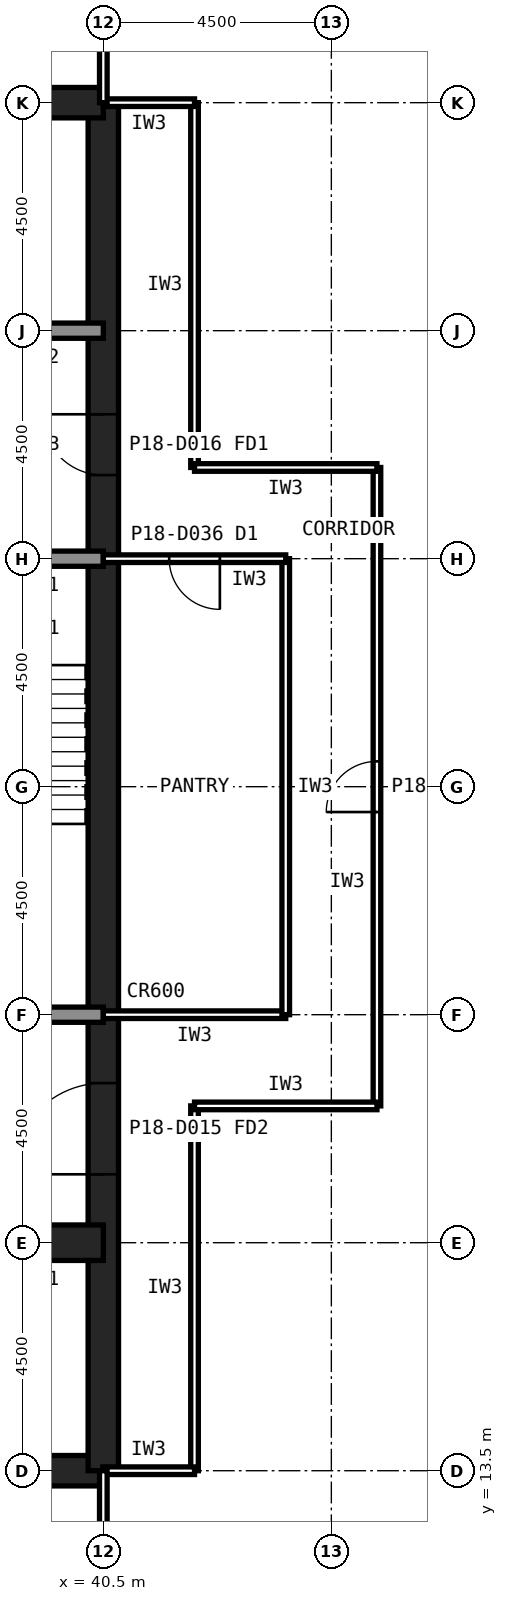
"""IFC4 building model, lengths in metres.
Left out: names, types, materials, properties, quantities, classifications, styles, units other than length and angle.
Written with IfcOpenShell. Run it as: python <this file> out.ifc"""

import sys

from ifc_helpers import new_model, si_unit, direction, frame, frame_2d, origin, place, context, subcontext, project, spatial, rectangle, extrude, element, fill, save


model = new_model("IFC4")
c1 = context("Model", 3, precision=1e-05, world=origin(), true_north=direction((0.0, 1.0)))
c2 = subcontext(c1, "Body", "Model", "MODEL_VIEW")
j1 = project(units=[si_unit("LENGTHUNIT", "METRE"), si_unit("PLANEANGLEUNIT", "RADIAN")], contexts=[c1])
p1 = place(None, origin())
s1 = spatial("IfcSite", under=j1, at=p1, CompositionType="ELEMENT")
p2 = place(p1, origin())
s2 = spatial("IfcBuilding", under=s1, at=p2, CompositionType="ELEMENT")
p3 = place(p2, frame((0.0, 0.0, 79.4)))
s3 = spatial("IfcBuildingStorey", under=s2, at=p3, CompositionType="ELEMENT", Elevation=79.4)
p4 = place(p3, frame((13.5, 13.5, 0.0), z_axis=(0.0, 0.0, 1.0), x_axis=(1.0, 0.0, 0.0)))
e1 = element("IfcWall", 1, at=p4, inside=s3, PredefinedType="SHEAR", context=c2, shape_type="SweptSolid", body=[
    extrude(rectangle(XDim=27.0, YDim=0.6, at=frame_2d((13.5, 0.0))), origin(), (0.0, 0.0, 1.0), 4.2),
])
p5 = place(p3, frame((40.5, 13.5, 0.0), z_axis=(0.0, 0.0, 1.0), x_axis=(0.0, 1.0, 0.0)))
e2 = element("IfcWall", 2, at=p5, inside=s3, PredefinedType="SHEAR", context=c2, shape_type="SweptSolid", body=[
    extrude(rectangle(XDim=27.0, YDim=0.6, at=frame_2d((13.5, 0.0))), origin(), (0.0, 0.0, 1.0), 4.2),
])
p6 = place(p5, frame((5.85, 0.0, 0.0)))
e3 = element("IfcOpeningElement", 3, at=p6, cuts=e2, PredefinedType="OPENING", context=c2, shape_type="SweptSolid", body=[
    extrude(rectangle(XDim=1.8, YDim=2.1, at=frame_2d((0.9, 1.05))), frame((0.0, 0.31, 0.0), z_axis=(0.0, -1.0, 0.0), x_axis=(1.0, 0.0, 0.0)), (0.0, 0.0, 1.0), 0.62),
])
p7 = place(p5, frame((19.65, 0.0, 0.0)))
e4 = element("IfcOpeningElement", 4, at=p7, cuts=e2, PredefinedType="OPENING", context=c2, shape_type="SweptSolid", body=[
    extrude(rectangle(XDim=1.2, YDim=2.1, at=frame_2d((0.6, 1.05))), frame((0.0, 0.31, 0.0), z_axis=(0.0, -1.0, 0.0), x_axis=(1.0, 0.0, 0.0)), (0.0, 0.0, 1.0), 0.62),
])
p8 = place(p3, frame((40.5, 40.5, 0.0), z_axis=(0.0, 0.0, 1.0), x_axis=(-1.0, 0.0, 0.0)))
e5 = element("IfcWall", 5, at=p8, inside=s3, PredefinedType="SHEAR", context=c2, shape_type="SweptSolid", body=[
    extrude(rectangle(XDim=27.0, YDim=0.6, at=frame_2d((13.5, 0.0))), origin(), (0.0, 0.0, 1.0), 4.2),
])
p9 = place(p3, frame((13.5, 18.0, 0.0), z_axis=(0.0, 0.0, 1.0), x_axis=(1.0, 0.0, 0.0)))
e6 = element("IfcWall", 6, at=p9, inside=s3, PredefinedType="SHEAR", context=c2, shape_type="SweptSolid", body=[
    extrude(rectangle(XDim=27.0, YDim=0.7, at=frame_2d((13.5, 0.0))), origin(), (0.0, 0.0, 1.0), 4.2),
])
p10 = place(p9, frame((24.3, 0.0, 0.0)))
e7 = element("IfcOpeningElement", 7, at=p10, cuts=e6, PredefinedType="OPENING", context=c2, shape_type="SweptSolid", body=[
    extrude(rectangle(XDim=0.9, YDim=2.1, at=frame_2d((0.45, 1.05))), frame((0.0, 0.36, 0.0), z_axis=(0.0, -1.0, 0.0), x_axis=(1.0, 0.0, 0.0)), (0.0, 0.0, 1.0), 0.72),
])
p11 = place(p9, frame((5.45, 0.0, 0.0)))
e8 = element("IfcOpeningElement", 8, at=p11, cuts=e6, PredefinedType="OPENING", context=c2, shape_type="SweptSolid", body=[
    extrude(rectangle(XDim=1.1, YDim=2.1, at=frame_2d((0.55, 1.05))), frame((0.0, 0.36, 0.0), z_axis=(0.0, -1.0, 0.0), x_axis=(1.0, 0.0, 0.0)), (0.0, 0.0, 1.0), 0.72),
])
p12 = place(p9, frame((8.45, 0.0, 0.0)))
e9 = element("IfcOpeningElement", 9, at=p12, cuts=e6, PredefinedType="OPENING", context=c2, shape_type="SweptSolid", body=[
    extrude(rectangle(XDim=1.1, YDim=2.1, at=frame_2d((0.55, 1.05))), frame((0.0, 0.36, 0.0), z_axis=(0.0, -1.0, 0.0), x_axis=(1.0, 0.0, 0.0)), (0.0, 0.0, 1.0), 0.72),
])
p13 = place(p9, frame((11.45, 0.0, 0.0)))
e10 = element("IfcOpeningElement", 10, at=p13, cuts=e6, PredefinedType="OPENING", context=c2, shape_type="SweptSolid", body=[
    extrude(rectangle(XDim=1.1, YDim=2.1, at=frame_2d((0.55, 1.05))), frame((0.0, 0.36, 0.0), z_axis=(0.0, -1.0, 0.0), x_axis=(1.0, 0.0, 0.0)), (0.0, 0.0, 1.0), 0.72),
])
p14 = place(p9, frame((14.45, 0.0, 0.0)))
e11 = element("IfcOpeningElement", 11, at=p14, cuts=e6, PredefinedType="OPENING", context=c2, shape_type="SweptSolid", body=[
    extrude(rectangle(XDim=1.1, YDim=2.1, at=frame_2d((0.55, 1.05))), frame((0.0, 0.36, 0.0), z_axis=(0.0, -1.0, 0.0), x_axis=(1.0, 0.0, 0.0)), (0.0, 0.0, 1.0), 0.72),
])
p15 = place(p9, frame((17.45, 0.0, 0.0)))
e12 = element("IfcOpeningElement", 12, at=p15, cuts=e6, PredefinedType="OPENING", context=c2, shape_type="SweptSolid", body=[
    extrude(rectangle(XDim=1.1, YDim=2.1, at=frame_2d((0.55, 1.05))), frame((0.0, 0.36, 0.0), z_axis=(0.0, -1.0, 0.0), x_axis=(1.0, 0.0, 0.0)), (0.0, 0.0, 1.0), 0.72),
])
p16 = place(p9, frame((20.45, 0.0, 0.0)))
e13 = element("IfcOpeningElement", 13, at=p16, cuts=e6, PredefinedType="OPENING", context=c2, shape_type="SweptSolid", body=[
    extrude(rectangle(XDim=1.1, YDim=2.1, at=frame_2d((0.55, 1.05))), frame((0.0, 0.36, 0.0), z_axis=(0.0, -1.0, 0.0), x_axis=(1.0, 0.0, 0.0)), (0.0, 0.0, 1.0), 0.72),
])
p17 = place(p9, frame((1.6, 0.0, 0.0)))
e14 = element("IfcOpeningElement", 14, at=p17, cuts=e6, PredefinedType="OPENING", context=c2, shape_type="SweptSolid", body=[
    extrude(rectangle(XDim=1.3, YDim=2.2, at=frame_2d((0.65, 1.1))), frame((0.0, 0.36, 0.0), z_axis=(0.0, -1.0, 0.0), x_axis=(1.0, 0.0, 0.0)), (0.0, 0.0, 1.0), 0.72),
])
p18 = place(p3, frame((13.5, 36.0, 0.0), z_axis=(0.0, 0.0, 1.0), x_axis=(1.0, 0.0, 0.0)))
e15 = element("IfcWall", 15, at=p18, inside=s3, PredefinedType="SOLIDWALL", context=c2, shape_type="SweptSolid", body=[
    extrude(rectangle(XDim=27.0, YDim=0.3, at=frame_2d((13.5, 0.0))), origin(), (0.0, 0.0, 1.0), 4.04),
])
p19 = place(p18, frame((1.8, 0.0, 0.0)))
e16 = element("IfcOpeningElement", 16, at=p19, cuts=e15, PredefinedType="OPENING", context=c2, shape_type="SweptSolid", body=[
    extrude(rectangle(XDim=0.9, YDim=2.1, at=frame_2d((0.45, 1.05))), frame((0.0, 0.16, 0.0), z_axis=(0.0, -1.0, 0.0), x_axis=(1.0, 0.0, 0.0)), (0.0, 0.0, 1.0), 0.32),
])
p20 = place(p18, frame((24.1, 0.0, 0.0)))
e17 = element("IfcOpeningElement", 17, at=p20, cuts=e15, PredefinedType="OPENING", context=c2, shape_type="SweptSolid", body=[
    extrude(rectangle(XDim=1.3, YDim=2.2, at=frame_2d((0.65, 1.1))), frame((0.0, 0.16, 0.0), z_axis=(0.0, -1.0, 0.0), x_axis=(1.0, 0.0, 0.0)), (0.0, 0.0, 1.0), 0.32),
])
p21 = place(p3, frame((13.5, 22.5, 0.0), z_axis=(0.0, 0.0, 1.0), x_axis=(1.0, 0.0, 0.0)))
e18 = element("IfcWall", 18, at=p21, inside=s3, PredefinedType="SOLIDWALL", context=c2, shape_type="SweptSolid", body=[
    extrude(rectangle(XDim=27.0, YDim=0.3, at=frame_2d((13.5, 0.0))), origin(), (0.0, 0.0, 1.0), 4.04),
])
p22 = place(p21, frame((1.65, 0.0, 0.0)))
e19 = element("IfcOpeningElement", 19, at=p22, cuts=e18, PredefinedType="OPENING", context=c2, shape_type="SweptSolid", body=[
    extrude(rectangle(XDim=1.2, YDim=2.1, at=frame_2d((0.6, 1.05))), frame((0.0, 0.16, 0.0), z_axis=(0.0, -1.0, 0.0), x_axis=(1.0, 0.0, 0.0)), (0.0, 0.0, 1.0), 0.32),
])
p23 = place(p21, frame((6.025, 0.0, 0.0)))
e20 = element("IfcOpeningElement", 20, at=p23, cuts=e18, PredefinedType="OPENING", context=c2, shape_type="SweptSolid", body=[
    extrude(rectangle(XDim=1.0, YDim=2.1, at=frame_2d((0.5, 1.05))), frame((0.0, 0.16, 0.0), z_axis=(0.0, -1.0, 0.0), x_axis=(1.0, 0.0, 0.0)), (0.0, 0.0, 1.0), 0.32),
])
p24 = place(p21, frame((10.525, 0.0, 0.0)))
e21 = element("IfcOpeningElement", 21, at=p24, cuts=e18, PredefinedType="OPENING", context=c2, shape_type="SweptSolid", body=[
    extrude(rectangle(XDim=1.0, YDim=2.1, at=frame_2d((0.5, 1.05))), frame((0.0, 0.16, 0.0), z_axis=(0.0, -1.0, 0.0), x_axis=(1.0, 0.0, 0.0)), (0.0, 0.0, 1.0), 0.32),
])
p25 = place(p21, frame((19.75, 0.0, 0.0)))
e22 = element("IfcOpeningElement", 22, at=p25, cuts=e18, PredefinedType="OPENING", context=c2, shape_type="SweptSolid", body=[
    extrude(rectangle(XDim=1.0, YDim=2.1, at=frame_2d((0.5, 1.05))), frame((0.0, 0.16, 0.0), z_axis=(0.0, -1.0, 0.0), x_axis=(1.0, 0.0, 0.0)), (0.0, 0.0, 1.0), 0.32),
])
p26 = place(p21, frame((15.05, 0.0, 0.0)))
e23 = element("IfcOpeningElement", 23, at=p26, cuts=e18, PredefinedType="OPENING", context=c2, shape_type="SweptSolid", body=[
    extrude(rectangle(XDim=1.4, YDim=2.4, at=frame_2d((0.7, 1.2))), frame((0.0, 0.16, 0.0), z_axis=(0.0, -1.0, 0.0), x_axis=(1.0, 0.0, 0.0)), (0.0, 0.0, 1.0), 0.32),
])
p27 = place(p3, frame((13.5, 31.5, 0.0), z_axis=(0.0, 0.0, 1.0), x_axis=(1.0, 0.0, 0.0)))
e24 = element("IfcWall", 24, at=p27, inside=s3, PredefinedType="SOLIDWALL", context=c2, shape_type="SweptSolid", body=[
    extrude(rectangle(XDim=27.0, YDim=0.3, at=frame_2d((13.5, 0.0))), origin(), (0.0, 0.0, 1.0), 4.04),
])
p28 = place(p27, frame((24.15, 0.0, 0.0)))
e25 = element("IfcOpeningElement", 25, at=p28, cuts=e24, PredefinedType="OPENING", context=c2, shape_type="SweptSolid", body=[
    extrude(rectangle(XDim=1.2, YDim=2.1, at=frame_2d((0.6, 1.05))), frame((0.0, 0.16, 0.0), z_axis=(0.0, -1.0, 0.0), x_axis=(1.0, 0.0, 0.0)), (0.0, 0.0, 1.0), 0.32),
])
p29 = place(p27, frame((15.3, 0.0, 0.0)))
e26 = element("IfcOpeningElement", 26, at=p29, cuts=e24, PredefinedType="OPENING", context=c2, shape_type="SweptSolid", body=[
    extrude(rectangle(XDim=0.9, YDim=2.1, at=frame_2d((0.45, 1.05))), frame((0.0, 0.16, 0.0), z_axis=(0.0, -1.0, 0.0), x_axis=(1.0, 0.0, 0.0)), (0.0, 0.0, 1.0), 0.32),
])
p30 = place(p27, frame((19.8, 0.0, 0.0)))
e27 = element("IfcOpeningElement", 27, at=p30, cuts=e24, PredefinedType="OPENING", context=c2, shape_type="SweptSolid", body=[
    extrude(rectangle(XDim=0.9, YDim=2.1, at=frame_2d((0.45, 1.05))), frame((0.0, 0.16, 0.0), z_axis=(0.0, -1.0, 0.0), x_axis=(1.0, 0.0, 0.0)), (0.0, 0.0, 1.0), 0.32),
])
p31 = place(p3, frame((45.9, 20.7, 0.0), z_axis=(0.0, 0.0, 1.0), x_axis=(0.0, 1.0, 0.0)))
e28 = element("IfcWall", 28, at=p31, inside=s3, PredefinedType="PARTITIONING", context=c2, shape_type="SweptSolid", body=[
    extrude(rectangle(XDim=12.6, YDim=0.15, at=frame_2d((6.3, 0.0))), origin(), (0.0, 0.0, 1.0), 4.04),
])
p32 = place(p31, frame((5.8, 0.0, 0.0)))
e29 = element("IfcOpeningElement", 29, at=p32, cuts=e28, PredefinedType="OPENING", context=c2, shape_type="SweptSolid", body=[
    extrude(rectangle(XDim=1.0, YDim=2.1, at=frame_2d((0.5, 1.05))), frame((0.0, 0.085, 0.0), z_axis=(0.0, -1.0, 0.0), x_axis=(1.0, 0.0, 0.0)), (0.0, 0.0, 1.0), 0.17),
])
for number, where, z_axis, x_axis in (
    (30, (42.3, 13.5, 0.0), (0.0, 0.0, 1.0), (0.0, 1.0, 0.0)),
    (31, (42.3, 33.3, 0.0), (0.0, 0.0, 1.0), (0.0, 1.0, 0.0)),
):
    element("IfcWall", number, at=place(p3, frame(where, z_axis=z_axis, x_axis=x_axis)), inside=s3, PredefinedType="PARTITIONING", context=c2, shape_type="SweptSolid", body=[
        extrude(rectangle(XDim=7.2, YDim=0.15, at=frame_2d((3.6, 0.0))), origin(), (0.0, 0.0, 1.0), 4.04),
    ])
for number, where, z_axis, x_axis in (
    (32, (42.3, 20.7, 0.0), (0.0, 0.0, 1.0), (1.0, 0.0, 0.0)),
    (33, (45.9, 33.3, 0.0), (0.0, 0.0, 1.0), (-1.0, 0.0, 0.0)),
):
    element("IfcWall", number, at=place(p3, frame(where, z_axis=z_axis, x_axis=x_axis)), inside=s3, PredefinedType="PARTITIONING", context=c2, shape_type="SweptSolid", body=[
        extrude(rectangle(XDim=3.6, YDim=0.15, at=frame_2d((1.8, 0.0))), origin(), (0.0, 0.0, 1.0), 4.04),
    ])
p33 = place(p3, frame((40.49, 13.5, 0.0), z_axis=(0.0, 0.0, 1.0), x_axis=(1.0, 0.0, 0.0)))
e34 = element("IfcWall", 34, at=p33, inside=s3, PredefinedType="PARTITIONING", context=c2, shape_type="SweptSolid", body=[
    extrude(rectangle(XDim=1.81, YDim=0.15, at=frame_2d((0.905, 0.0))), origin(), (0.0, 0.0, 1.0), 3.189),
])
p34 = place(p3, frame((42.3, 40.5, 0.0), z_axis=(0.0, 0.0, 1.0), x_axis=(-1.0, 0.0, 0.0)))
e35 = element("IfcWall", 35, at=p34, inside=s3, PredefinedType="PARTITIONING", context=c2, shape_type="SweptSolid", body=[
    extrude(rectangle(XDim=1.8, YDim=0.15, at=frame_2d((0.9, 0.0))), origin(), (0.0, 0.0, 1.0), 3.189),
])
p35 = place(p3, frame((40.5, 22.5, 0.0), z_axis=(0.0, 0.0, 1.0), x_axis=(1.0, 0.0, 0.0)))
e36 = element("IfcWall", 36, at=p35, inside=s3, PredefinedType="PARTITIONING", context=c2, shape_type="SweptSolid", body=[
    extrude(rectangle(XDim=3.6, YDim=0.15, at=frame_2d((1.8, 0.0))), origin(), (0.0, 0.0, 1.0), 3.189),
])
p36 = place(p3, frame((44.1, 22.5, 0.0), z_axis=(0.0, 0.0, 1.0), x_axis=(0.0, 1.0, 0.0)))
e37 = element("IfcWall", 37, at=p36, inside=s3, PredefinedType="PARTITIONING", context=c2, shape_type="SweptSolid", body=[
    extrude(rectangle(XDim=9.0, YDim=0.15, at=frame_2d((4.5, 0.0))), origin(), (0.0, 0.0, 1.0), 4.04),
])
p37 = place(p3, frame((44.1, 31.5, 0.0), z_axis=(0.0, 0.0, 1.0), x_axis=(-1.0, 0.0, 0.0)))
e38 = element("IfcWall", 38, at=p37, inside=s3, PredefinedType="PARTITIONING", context=c2, shape_type="SweptSolid", body=[
    extrude(rectangle(XDim=3.6, YDim=0.15, at=frame_2d((1.8, 0.0))), origin(), (0.0, 0.0, 1.0), 3.189),
])
p38 = place(p37, frame((1.3, 0.0, 0.0)))
e39 = element("IfcOpeningElement", 39, at=p38, cuts=e38, PredefinedType="OPENING", context=c2, shape_type="SweptSolid", body=[
    extrude(rectangle(XDim=1.0, YDim=2.1, at=frame_2d((0.5, 1.05))), frame((0.0, 0.085, 0.0), z_axis=(0.0, -1.0, 0.0), x_axis=(1.0, 0.0, 0.0)), (0.0, 0.0, 1.0), 0.17),
])
p39 = place(p3, frame((40.5, 40.5, 0.0), z_axis=(0.0, 0.0, 1.0), x_axis=(0.0, 1.0, 0.0)))
e40 = element("IfcWall", 40, at=p39, inside=s3, PredefinedType="PARTITIONING", context=c2, shape_type="SweptSolid", body=[
    extrude(rectangle(XDim=3.0, YDim=0.15, at=frame_2d((1.5, 0.0))), origin(), (0.0, 0.0, 1.0), 3.189),
])
p40 = place(p3, frame((40.5, 5.4, 0.0), z_axis=(0.0, 0.0, 1.0), x_axis=(0.0, 1.0, 0.0)))
e41 = element("IfcWall", 41, at=p40, inside=s3, PredefinedType="PARTITIONING", context=c2, shape_type="SweptSolid", body=[
    extrude(rectangle(XDim=8.1, YDim=0.15, at=frame_2d((4.05, 0.0))), origin(), (0.0, 0.0, 1.0), 3.189),
])
p41 = place(p40, frame((3.55, 0.0, 0.0)))
e42 = element("IfcOpeningElement", 42, at=p41, cuts=e41, PredefinedType="OPENING", context=c2, shape_type="SweptSolid", body=[
    extrude(rectangle(XDim=1.0, YDim=2.1, at=frame_2d((0.5, 1.05))), frame((0.0, 0.085, 0.0), z_axis=(0.0, -1.0, 0.0), x_axis=(1.0, 0.0, 0.0)), (0.0, 0.0, 1.0), 0.17),
])
p42 = place(p6, origin())
e43 = element("IfcDoor", 43, at=p42, inside=s3, OperationType="SINGLE_SWING_LEFT", PredefinedType="DOOR", context=c2, shape_type="SweptSolid", body=[
    extrude(rectangle(XDim=1.8, YDim=2.1, at=frame_2d((0.9, 1.05))), frame((0.0, 0.025, 0.0), z_axis=(0.0, -1.0, 0.0), x_axis=(1.0, 0.0, 0.0)), (0.0, 0.0, 1.0), 0.05),
])
fill(e3, e43)
p43 = place(p7, origin())
e44 = element("IfcDoor", 44, at=p43, inside=s3, OperationType="SINGLE_SWING_RIGHT", PredefinedType="DOOR", context=c2, shape_type="SweptSolid", body=[
    extrude(rectangle(XDim=1.2, YDim=2.1, at=frame_2d((0.6, 1.05))), frame((0.0, 0.025, 0.0), z_axis=(0.0, -1.0, 0.0), x_axis=(1.0, 0.0, 0.0)), (0.0, 0.0, 1.0), 0.05),
])
fill(e4, e44)
p44 = place(p32, origin())
e45 = element("IfcDoor", 45, at=p44, inside=s3, OperationType="SINGLE_SWING_LEFT", PredefinedType="DOOR", context=c2, shape_type="SweptSolid", body=[
    extrude(rectangle(XDim=1.0, YDim=2.1, at=frame_2d((0.5, 1.05))), frame((0.0, 0.025, 0.0), z_axis=(0.0, -1.0, 0.0), x_axis=(1.0, 0.0, 0.0)), (0.0, 0.0, 1.0), 0.05),
])
fill(e29, e45)
p45 = place(p38, origin())
e46 = element("IfcDoor", 46, at=p45, inside=s3, OperationType="SINGLE_SWING_LEFT", PredefinedType="DOOR", context=c2, shape_type="SweptSolid", body=[
    extrude(rectangle(XDim=1.0, YDim=2.1, at=frame_2d((0.5, 1.05))), frame((0.0, 0.025, 0.0), z_axis=(0.0, -1.0, 0.0), x_axis=(1.0, 0.0, 0.0)), (0.0, 0.0, 1.0), 0.05),
])
fill(e39, e46)
save(model, sys.argv[1])
